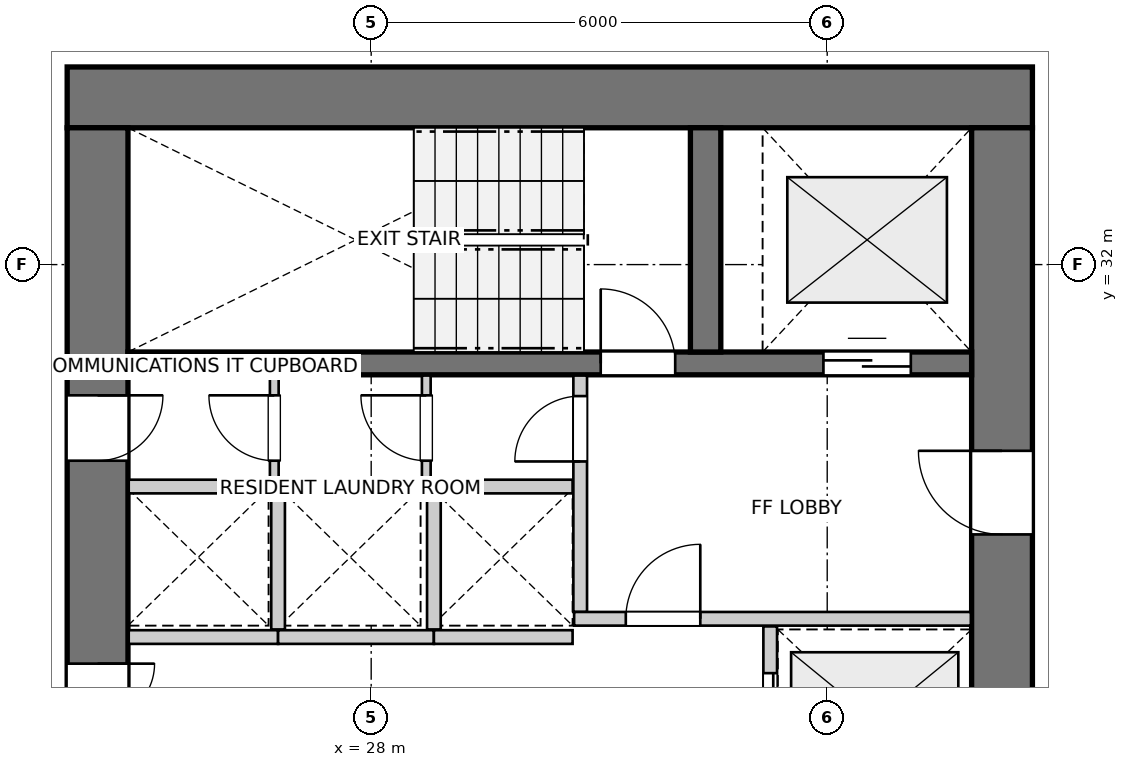
"""IFC4 building model, lengths in metres.
Left out: names, types, materials, properties, quantities, classifications, styles, units other than length and angle.
Written with IfcOpenShell. Run it as: python <this file> out.ifc"""

import sys

from ifc_helpers import new_model, si_unit, direction, frame, frame_2d, origin, place, context, subcontext, project, spatial, rectangle, extrude, source, transform, mapped, element, fill, save


model = new_model("IFC4")
c1 = context("Model", 3, precision=1e-05, world=origin(), true_north=direction((0.0, 1.0)))
c2 = subcontext(c1, "Body", "Model", "MODEL_VIEW")
j1 = project(units=[si_unit("LENGTHUNIT", "METRE"), si_unit("PLANEANGLEUNIT", "RADIAN")], contexts=[c1])
p1 = place(None, origin())
s1 = spatial("IfcSite", under=j1, at=p1, CompositionType="ELEMENT")
p2 = place(p1, origin())
s2 = spatial("IfcBuilding", under=s1, at=p2, CompositionType="ELEMENT")
p3 = place(p2, frame((0.0, 0.0, 62.2)))
s3 = spatial("IfcBuildingStorey", under=s2, at=p3, CompositionType="ELEMENT", Elevation=62.2)
p4 = place(p3, frame((36.7, 34.2, 0.0), z_axis=(0.0, 0.0, 1.0), x_axis=(-1.0, 0.0, 0.0)))
e1 = element("IfcWall", 1, at=p4, inside=s3, PredefinedType="SHEAR", context=c2, shape_type="SweptSolid", body=[
    extrude(rectangle(XDim=12.7, YDim=0.8, at=frame_2d((6.35, 0.0))), origin(), (0.0, 0.0, 1.0), 2.9),
])
p5 = place(p3, frame((24.4, 33.8, 0.0), z_axis=(0.0, 0.0, 1.0), x_axis=(0.0, -1.0, 0.0)))
e2 = element("IfcWall", 2, at=p5, inside=s3, PredefinedType="SHEAR", context=c2, shape_type="SweptSolid", body=[
    extrude(rectangle(XDim=15.6, YDim=0.8, at=frame_2d((7.8, 0.0))), origin(), (0.0, 0.0, 1.0), 2.9),
])
p6 = place(p5, frame((7.05, 0.0, 0.0)))
e3 = element("IfcOpeningElement", 3, at=p6, cuts=e2, PredefinedType="OPENING", context=c2, shape_type="SweptSolid", body=[
    extrude(rectangle(XDim=1.5, YDim=2.15, at=frame_2d((0.75, 1.075))), frame((0.0, 0.41, 0.0), z_axis=(0.0, -1.0, 0.0), x_axis=(1.0, 0.0, 0.0)), (0.0, 0.0, 1.0), 0.82),
])
p7 = place(p5, frame((3.52, 0.0, 0.0)))
e4 = element("IfcOpeningElement", 4, at=p7, cuts=e2, PredefinedType="OPENING", context=c2, shape_type="SweptSolid", body=[
    extrude(rectangle(XDim=0.86, YDim=2.05, at=frame_2d((0.43, 1.025))), frame((0.0, 0.41, 0.0), z_axis=(0.0, -1.0, 0.0), x_axis=(1.0, 0.0, 0.0)), (0.0, 0.0, 1.0), 0.82),
])
p8 = place(p5, frame((11.22, 0.0, 0.0)))
e5 = element("IfcOpeningElement", 5, at=p8, cuts=e2, PredefinedType="OPENING", context=c2, shape_type="SweptSolid", body=[
    extrude(rectangle(XDim=0.86, YDim=2.05, at=frame_2d((0.43, 1.025))), frame((0.0, 0.41, 0.0), z_axis=(0.0, -1.0, 0.0), x_axis=(1.0, 0.0, 0.0)), (0.0, 0.0, 1.0), 0.82),
])
p9 = place(p3, frame((36.3, 18.2, 0.0), z_axis=(0.0, 0.0, 1.0), x_axis=(0.0, 1.0, 0.0)))
e6 = element("IfcWall", 6, at=p9, inside=s3, PredefinedType="SHEAR", context=c2, shape_type="SweptSolid", body=[
    extrude(rectangle(XDim=15.6, YDim=0.8, at=frame_2d((7.8, 0.0))), origin(), (0.0, 0.0, 1.0), 2.9),
])
p10 = place(p9, frame((4.25, 0.0, 0.0)))
e7 = element("IfcOpeningElement", 7, at=p10, cuts=e6, PredefinedType="OPENING", context=c2, shape_type="SweptSolid", body=[
    extrude(rectangle(XDim=1.1, YDim=2.15, at=frame_2d((0.55, 1.075))), frame((0.0, 0.41, 0.0), z_axis=(0.0, -1.0, 0.0), x_axis=(1.0, 0.0, 0.0)), (0.0, 0.0, 1.0), 0.82),
])
p11 = place(p9, frame((10.25, 0.0, 0.0)))
e8 = element("IfcOpeningElement", 8, at=p11, cuts=e6, PredefinedType="OPENING", context=c2, shape_type="SweptSolid", body=[
    extrude(rectangle(XDim=1.1, YDim=2.15, at=frame_2d((0.55, 1.075))), frame((0.0, 0.41, 0.0), z_axis=(0.0, -1.0, 0.0), x_axis=(1.0, 0.0, 0.0)), (0.0, 0.0, 1.0), 0.82),
])
p12 = place(p3, frame((24.8, 30.7, 0.0), z_axis=(0.0, 0.0, 1.0), x_axis=(1.0, 0.0, 0.0)))
e9 = element("IfcWall", 9, at=p12, inside=s3, PredefinedType="SHEAR", context=c2, shape_type="SweptSolid", body=[
    extrude(rectangle(XDim=11.1, YDim=0.3, at=frame_2d((5.55, 0.0))), origin(), (0.0, 0.0, 1.0), 2.9),
])
p13 = place(p12, frame((6.22, 0.0, 0.0)))
e10 = element("IfcOpeningElement", 10, at=p13, cuts=e9, PredefinedType="OPENING", context=c2, shape_type="SweptSolid", body=[
    extrude(rectangle(XDim=0.98, YDim=2.15, at=frame_2d((0.49, 1.075))), frame((0.0, 0.16, 0.0), z_axis=(0.0, -1.0, 0.0), x_axis=(1.0, 0.0, 0.0)), (0.0, 0.0, 1.0), 0.32),
])
p14 = place(p12, frame((9.15, 0.0, 0.0)))
e11 = element("IfcOpeningElement", 11, at=p14, cuts=e9, PredefinedType="OPENING", context=c2, shape_type="SweptSolid", body=[
    extrude(rectangle(XDim=1.15, YDim=2.15, at=frame_2d((0.575, 1.075))), frame((0.0, 0.16, 0.0), z_axis=(0.0, -1.0, 0.0), x_axis=(1.0, 0.0, 0.0)), (0.0, 0.0, 1.0), 0.32),
])
p15 = place(p3, frame((32.4, 30.85, 0.0), z_axis=(0.0, 0.0, 1.0), x_axis=(0.0, 1.0, 0.0)))
e12 = element("IfcWall", 12, at=p15, inside=s3, PredefinedType="SHEAR", context=c2, shape_type="SweptSolid", body=[
    extrude(rectangle(XDim=2.95, YDim=0.4, at=frame_2d((1.475, 0.0))), origin(), (0.0, 0.0, 1.0), 2.9),
])
p16 = place(p3, frame((30.75, 27.43, 0.0), z_axis=(0.0, 0.0, 1.0), x_axis=(0.0, 1.0, 0.0)))
e13 = element("IfcWall", 13, at=p16, inside=s3, PredefinedType="PARTITIONING", context=c2, shape_type="SweptSolid", body=[
    extrude(rectangle(XDim=3.11, YDim=0.18, at=frame_2d((1.555, 0.0))), origin(), (0.0, 0.0, 1.0), 2.9),
])
p17 = place(p16, frame((1.98, 0.0, 0.0)))
e14 = element("IfcOpeningElement", 14, at=p17, cuts=e13, PredefinedType="OPENING", context=c2, shape_type="SweptSolid", body=[
    extrude(rectangle(XDim=0.86, YDim=2.05, at=frame_2d((0.43, 1.025))), frame((0.0, 0.1, 0.0), z_axis=(0.0, -1.0, 0.0), x_axis=(1.0, 0.0, 0.0)), (0.0, 0.0, 1.0), 0.2),
])
p18 = place(p3, frame((30.67, 27.34, 0.0), z_axis=(0.0, 0.0, 1.0), x_axis=(1.0, 0.0, 0.0)))
e15 = element("IfcWall", 15, at=p18, inside=s3, PredefinedType="PARTITIONING", context=c2, shape_type="SweptSolid", body=[
    extrude(rectangle(XDim=5.22, YDim=0.18, at=frame_2d((2.61, 0.0))), origin(), (0.0, 0.0, 1.0), 2.9),
])
p19 = place(p18, frame((0.68, 0.0, 0.0)))
e16 = element("IfcOpeningElement", 16, at=p19, cuts=e15, PredefinedType="OPENING", context=c2, shape_type="SweptSolid", body=[
    extrude(rectangle(XDim=0.98, YDim=2.15, at=frame_2d((0.49, 1.075))), frame((0.0, 0.1, 0.0), z_axis=(0.0, -1.0, 0.0), x_axis=(1.0, 0.0, 0.0)), (0.0, 0.0, 1.0), 0.2),
])
p20 = place(p3, frame((33.25, 24.76, 0.0), z_axis=(0.0, 0.0, 1.0), x_axis=(0.0, 1.0, 0.0)))
e17 = element("IfcWall", 17, at=p20, inside=s3, PredefinedType="PARTITIONING", context=c2, shape_type="SweptSolid", body=[
    extrude(rectangle(XDim=2.48, YDim=0.18, at=frame_2d((1.24, 0.0))), origin(), (0.0, 0.0, 1.0), 2.9),
])
p21 = place(p20, frame((0.615, 0.0, 0.0)))
e18 = element("IfcOpeningElement", 18, at=p21, cuts=e17, PredefinedType="OPENING", context=c2, shape_type="SweptSolid", body=[
    extrude(rectangle(XDim=1.25, YDim=2.15, at=frame_2d((0.625, 1.075))), frame((0.0, 0.1, 0.0), z_axis=(0.0, -1.0, 0.0), x_axis=(1.0, 0.0, 0.0)), (0.0, 0.0, 1.0), 0.2),
])
p22 = place(p3, frame((24.81, 29.08, 0.0), z_axis=(0.0, 0.0, 1.0), x_axis=(1.0, 0.0, 0.0)))
e19 = element("IfcWall", 19, at=p22, inside=s3, PredefinedType="PARTITIONING", context=c2, shape_type="SweptSolid", body=[
    extrude(rectangle(XDim=5.84, YDim=0.18, at=frame_2d((2.92, 0.0))), origin(), (0.0, 0.0, 1.0), 2.9),
])
p23 = place(p3, frame((24.81, 27.1, 0.0), z_axis=(0.0, 0.0, 1.0), x_axis=(1.0, 0.0, 0.0)))
e20 = element("IfcWall", 20, at=p23, inside=s3, PredefinedType="PARTITIONING", context=c2, shape_type="SweptSolid", body=[
    extrude(rectangle(XDim=1.965, YDim=0.18, at=frame_2d((0.982, 0.0))), origin(), (0.0, 0.0, 1.0), 2.9),
])
p24 = place(p3, frame((26.775, 27.1, 0.0), z_axis=(0.0, 0.0, 1.0), x_axis=(1.0, 0.0, 0.0)))
e21 = element("IfcWall", 21, at=p24, inside=s3, PredefinedType="PARTITIONING", context=c2, shape_type="SweptSolid", body=[
    extrude(rectangle(XDim=2.05, YDim=0.18, at=frame_2d((1.025, 0.0))), origin(), (0.0, 0.0, 1.0), 2.9),
])
p25 = place(p3, frame((26.775, 27.2, 0.0), z_axis=(0.0, 0.0, 1.0), x_axis=(0.0, 1.0, 0.0)))
e22 = element("IfcWall", 22, at=p25, inside=s3, PredefinedType="PARTITIONING", context=c2, shape_type="SweptSolid", body=[
    extrude(rectangle(XDim=1.78, YDim=0.18, at=frame_2d((0.89, 0.0))), origin(), (0.0, 0.0, 1.0), 2.9),
])
p26 = place(p3, frame((28.825, 27.1, 0.0), z_axis=(0.0, 0.0, 1.0), x_axis=(1.0, 0.0, 0.0)))
e23 = element("IfcWall", 23, at=p26, inside=s3, PredefinedType="PARTITIONING", context=c2, shape_type="SweptSolid", body=[
    extrude(rectangle(XDim=1.825, YDim=0.18, at=frame_2d((0.913, 0.0))), origin(), (0.0, 0.0, 1.0), 2.9),
])
p27 = place(p3, frame((28.825, 27.2, 0.0), z_axis=(0.0, 0.0, 1.0), x_axis=(0.0, 1.0, 0.0)))
e24 = element("IfcWall", 24, at=p27, inside=s3, PredefinedType="PARTITIONING", context=c2, shape_type="SweptSolid", body=[
    extrude(rectangle(XDim=1.78, YDim=0.18, at=frame_2d((0.89, 0.0))), origin(), (0.0, 0.0, 1.0), 2.9),
])
p28 = place(p3, frame((26.725, 29.16, 0.0), z_axis=(0.0, 0.0, 1.0), x_axis=(0.0, 1.0, 0.0)))
e25 = element("IfcWall", 25, at=p28, inside=s3, PredefinedType="PARTITIONING", context=c2, shape_type="SweptSolid", body=[
    extrude(rectangle(XDim=1.38, YDim=0.115, at=frame_2d((0.69, 0.0))), origin(), (0.0, 0.0, 1.0), 2.9),
])
p29 = place(p28, frame((0.26, 0.0, 0.0)))
e26 = element("IfcOpeningElement", 26, at=p29, cuts=e25, PredefinedType="OPENING", context=c2, shape_type="SweptSolid", body=[
    extrude(rectangle(XDim=0.86, YDim=2.05, at=frame_2d((0.43, 1.025))), frame((0.0, 0.067, 0.0), z_axis=(0.0, -1.0, 0.0), x_axis=(1.0, 0.0, 0.0)), (0.0, 0.0, 1.0), 0.135),
])
p30 = place(p3, frame((28.725, 29.16, 0.0), z_axis=(0.0, 0.0, 1.0), x_axis=(0.0, 1.0, 0.0)))
e27 = element("IfcWall", 27, at=p30, inside=s3, PredefinedType="PARTITIONING", context=c2, shape_type="SweptSolid", body=[
    extrude(rectangle(XDim=1.38, YDim=0.115, at=frame_2d((0.69, 0.0))), origin(), (0.0, 0.0, 1.0), 2.9),
])
p31 = place(p30, frame((0.26, 0.0, 0.0)))
e28 = element("IfcOpeningElement", 28, at=p31, cuts=e27, PredefinedType="OPENING", context=c2, shape_type="SweptSolid", body=[
    extrude(rectangle(XDim=0.86, YDim=2.05, at=frame_2d((0.43, 1.025))), frame((0.0, 0.067, 0.0), z_axis=(0.0, -1.0, 0.0), x_axis=(1.0, 0.0, 0.0)), (0.0, 0.0, 1.0), 0.135),
])
m1 = source(origin(), c2, "Body", "SweptSolid", [
    extrude(rectangle(XDim=0.98, YDim=2.15, at=frame_2d((0.49, 1.075))), frame((0.0, 0.025, 0.0), z_axis=(0.0, -1.0, 0.0), x_axis=(1.0, 0.0, 0.0)), (0.0, 0.0, 1.0), 0.05),
])
p32 = place(p13, origin())
e29 = element("IfcDoor", 29, at=p32, inside=s3, OperationType="SINGLE_SWING_LEFT", PredefinedType="DOOR", context=c2, shape_type="MappedRepresentation", body=[
    mapped(m1, transform((0.0, 0.0, 0.0), x_axis=(1.0, 0.0, 0.0), y_axis=(0.0, 1.0, 0.0), z_axis=(0.0, 0.0, 1.0), scale=1.0)),
])
fill(e10, e29)
m2 = source(origin(), c2, "Body", "SweptSolid", [
    extrude(rectangle(XDim=1.15, YDim=2.15, at=frame_2d((0.575, 1.075))), frame((0.0, 0.025, 0.0), z_axis=(0.0, -1.0, 0.0), x_axis=(1.0, 0.0, 0.0)), (0.0, 0.0, 1.0), 0.05),
])
p33 = place(p14, origin())
e30 = element("IfcDoor", 30, at=p33, inside=s3, OperationType="DOUBLE_DOOR_SLIDING", PredefinedType="DOOR", context=c2, shape_type="MappedRepresentation", body=[
    mapped(m2, transform((0.0, 0.0, 0.0), x_axis=(1.0, 0.0, 0.0), y_axis=(0.0, 1.0, 0.0), z_axis=(0.0, 0.0, 1.0), scale=1.0)),
])
fill(e11, e30)
m3 = source(origin(), c2, "Body", "SweptSolid", [
    extrude(rectangle(XDim=1.1, YDim=2.15, at=frame_2d((0.55, 1.075))), frame((0.0, 0.025, 0.0), z_axis=(0.0, -1.0, 0.0), x_axis=(1.0, 0.0, 0.0)), (0.0, 0.0, 1.0), 0.05),
])
p34 = place(p11, origin())
e31 = element("IfcDoor", 31, at=p34, inside=s3, OperationType="SINGLE_SWING_RIGHT", PredefinedType="DOOR", context=c2, shape_type="MappedRepresentation", body=[
    mapped(m3, transform((0.0, 0.0, 0.0), x_axis=(1.0, 0.0, 0.0), y_axis=(0.0, 1.0, 0.0), z_axis=(0.0, 0.0, 1.0), scale=1.0)),
])
fill(e8, e31)
m4 = source(origin(), c2, "Body", "SweptSolid", [
    extrude(rectangle(XDim=1.5, YDim=2.15, at=frame_2d((0.75, 1.075))), frame((0.0, 0.025, 0.0), z_axis=(0.0, -1.0, 0.0), x_axis=(1.0, 0.0, 0.0)), (0.0, 0.0, 1.0), 0.05),
])
p35 = place(p6, origin())
e32 = element("IfcDoor", 32, at=p35, inside=s3, OperationType="DOUBLE_DOOR_SINGLE_SWING", PredefinedType="DOOR", context=c2, shape_type="MappedRepresentation", body=[
    mapped(m4, transform((0.0, 0.0, 0.0), x_axis=(1.0, 0.0, 0.0), y_axis=(0.0, 1.0, 0.0), z_axis=(0.0, 0.0, 1.0), scale=1.0)),
])
fill(e3, e32)
m5 = source(origin(), c2, "Body", "SweptSolid", [
    extrude(rectangle(XDim=0.86, YDim=2.05, at=frame_2d((0.43, 1.025))), frame((0.0, 0.025, 0.0), z_axis=(0.0, -1.0, 0.0), x_axis=(1.0, 0.0, 0.0)), (0.0, 0.0, 1.0), 0.05),
])
p36 = place(p7, origin())
e33 = element("IfcDoor", 33, at=p36, inside=s3, OperationType="SINGLE_SWING_LEFT", PredefinedType="DOOR", context=c2, shape_type="MappedRepresentation", body=[
    mapped(m5, transform((0.0, 0.0, 0.0), x_axis=(1.0, 0.0, 0.0), y_axis=(0.0, 1.0, 0.0), z_axis=(0.0, 0.0, 1.0), scale=1.0)),
])
fill(e4, e33)
p37 = place(p17, origin())
e34 = element("IfcDoor", 34, at=p37, inside=s3, OperationType="SINGLE_SWING_LEFT", PredefinedType="DOOR", context=c2, shape_type="MappedRepresentation", body=[
    mapped(m5, transform((0.0, 0.0, 0.0), x_axis=(1.0, 0.0, 0.0), y_axis=(0.0, 1.0, 0.0), z_axis=(0.0, 0.0, 1.0), scale=1.0)),
])
fill(e14, e34)
p38 = place(p19, origin())
e35 = element("IfcDoor", 35, at=p38, inside=s3, OperationType="SINGLE_SWING_RIGHT", PredefinedType="DOOR", context=c2, shape_type="MappedRepresentation", body=[
    mapped(m1, transform((0.0, 0.0, 0.0), x_axis=(1.0, 0.0, 0.0), y_axis=(0.0, 1.0, 0.0), z_axis=(0.0, 0.0, 1.0), scale=1.0)),
])
fill(e16, e35)
m6 = source(origin(), c2, "Body", "SweptSolid", [
    extrude(rectangle(XDim=1.25, YDim=2.15, at=frame_2d((0.625, 1.075))), frame((0.0, 0.025, 0.0), z_axis=(0.0, -1.0, 0.0), x_axis=(1.0, 0.0, 0.0)), (0.0, 0.0, 1.0), 0.05),
])
p39 = place(p21, origin())
e36 = element("IfcDoor", 36, at=p39, inside=s3, OperationType="DOUBLE_DOOR_SLIDING", PredefinedType="DOOR", context=c2, shape_type="MappedRepresentation", body=[
    mapped(m6, transform((0.0, 0.0, 0.0), x_axis=(1.0, 0.0, 0.0), y_axis=(0.0, 1.0, 0.0), z_axis=(0.0, 0.0, 1.0), scale=1.0)),
])
fill(e18, e36)
p40 = place(p29, origin())
e37 = element("IfcDoor", 37, at=p40, inside=s3, OperationType="SINGLE_SWING_RIGHT", PredefinedType="DOOR", context=c2, shape_type="MappedRepresentation", body=[
    mapped(m5, transform((0.0, 0.0, 0.0), x_axis=(1.0, 0.0, 0.0), y_axis=(0.0, 1.0, 0.0), z_axis=(0.0, 0.0, 1.0), scale=1.0)),
])
fill(e26, e37)
p41 = place(p31, origin())
e38 = element("IfcDoor", 38, at=p41, inside=s3, OperationType="SINGLE_SWING_RIGHT", PredefinedType="DOOR", context=c2, shape_type="MappedRepresentation", body=[
    mapped(m5, transform((0.0, 0.0, 0.0), x_axis=(1.0, 0.0, 0.0), y_axis=(0.0, 1.0, 0.0), z_axis=(0.0, 0.0, 1.0), scale=1.0)),
])
fill(e28, e38)
save(model, sys.argv[1])
